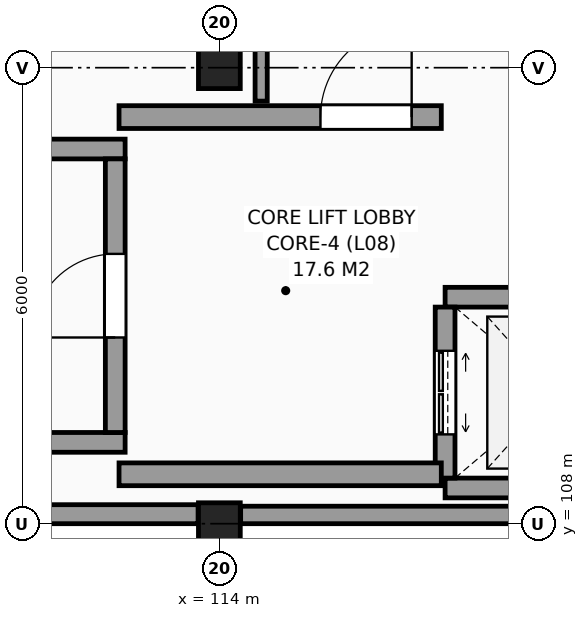
"""IFC4 building model, lengths in metres.
Left out: names, types, materials, properties, quantities, classifications, styles, units other than length and angle.
Written with IfcOpenShell. Run it as: python <this file> out.ifc"""

import sys

from ifc_helpers import new_model, si_unit, direction, frame, frame_2d, origin, origin_2d, place, context, subcontext, project, spatial, rectangle, extrude, element, fill, save


model = new_model("IFC4")
c1 = context("Model", 3, precision=1e-05, world=origin(), true_north=direction((0.0, 1.0)))
c2 = subcontext(c1, "Body", "Model", "MODEL_VIEW")
j1 = project(units=[si_unit("LENGTHUNIT", "METRE"), si_unit("PLANEANGLEUNIT", "RADIAN")], contexts=[c1])
p1 = place(None, origin())
s1 = spatial("IfcSite", under=j1, at=p1, CompositionType="ELEMENT")
p2 = place(p1, origin())
s2 = spatial("IfcBuilding", under=s1, at=p2, CompositionType="ELEMENT")
p3 = place(p2, frame((0.0, 0.0, 34.8)))
s3 = spatial("IfcBuildingStorey", under=s2, at=p3, CompositionType="ELEMENT", Elevation=34.8)
for number, where, z_axis, x_axis in (
    (1, (114.0, 108.0, 0.0), (0.0, 0.0, 1.0), (1.0, 0.0, 0.0)),
    (2, (114.0, 114.0, 0.0), (0.0, 0.0, 1.0), (1.0, 0.0, 0.0)),
):
    element("IfcColumn", number, at=place(p3, frame(where, z_axis=z_axis, x_axis=x_axis)), inside=s3, PredefinedType="COLUMN", context=c2, shape_type="SweptSolid", body=[
        extrude(rectangle(XDim=0.55, YDim=0.55, at=origin_2d()), origin(), (0.0, 0.0, 1.0), 3.3),
    ])
p4 = place(p3, frame((108.305, 108.125, 0.0), z_axis=(0.0, 0.0, 1.0), x_axis=(1.0, 0.0, 0.0)))
e3 = element("IfcWall", 3, at=p4, inside=s3, PredefinedType="SOLIDWALL", context=c2, shape_type="SweptSolid", body=[
    extrude(rectangle(XDim=5.415, YDim=0.25, at=frame_2d((2.708, 0.0))), origin(), (0.0, 0.0, 1.0), 2.42),
])
p5 = place(p3, frame((114.28, 108.115, 0.0), z_axis=(0.0, 0.0, 1.0), x_axis=(1.0, 0.0, 0.0)))
e4 = element("IfcWall", 4, at=p5, inside=s3, PredefinedType="SOLIDWALL", context=c2, shape_type="SweptSolid", body=[
    extrude(rectangle(XDim=5.415, YDim=0.23, at=frame_2d((2.708, 0.0))), origin(), (0.0, 0.0, 1.0), 2.42),
])
for number, where, z_axis, x_axis in (
    (5, (102.04, 109.07, 0.0), (0.0, 0.0, 1.0), (1.0, 0.0, 0.0)),
    (6, (102.04, 112.93, 0.0), (0.0, 0.0, 1.0), (1.0, 0.0, 0.0)),
):
    element("IfcWall", number, at=place(p3, frame(where, z_axis=z_axis, x_axis=x_axis)), inside=s3, PredefinedType="SHEAR", context=c2, shape_type="SweptSolid", body=[
        extrude(rectangle(XDim=10.72, YDim=0.26, at=frame_2d((5.36, 0.0))), origin(), (0.0, 0.0, 1.0), 3.3),
    ])
p6 = place(p3, frame((112.63, 109.2, 0.0), z_axis=(0.0, 0.0, 1.0), x_axis=(0.0, 1.0, 0.0)))
e7 = element("IfcWall", 7, at=p6, inside=s3, PredefinedType="SHEAR", context=c2, shape_type="SweptSolid", body=[
    extrude(rectangle(XDim=3.6, YDim=0.26, at=frame_2d((1.8, 0.0))), origin(), (0.0, 0.0, 1.0), 3.3),
])
p7 = place(p6, frame((1.25, 0.0, 0.0)))
e8 = element("IfcOpeningElement", 8, at=p7, cuts=e7, PredefinedType="OPENING", context=c2, shape_type="SweptSolid", body=[
    extrude(rectangle(XDim=1.1, YDim=2.15, at=frame_2d((0.55, 1.075))), frame((0.0, 0.14, 0.0), z_axis=(0.0, -1.0, 0.0), x_axis=(1.0, 0.0, 0.0)), (0.0, 0.0, 1.0), 0.28),
])
for number, where, z_axis, x_axis in (
    (9, (116.97, 108.47, 0.0), (0.0, 0.0, 1.0), (1.0, 0.0, 0.0)),
    (10, (116.97, 110.98, 0.0), (0.0, 0.0, 1.0), (1.0, 0.0, 0.0)),
):
    element("IfcWall", number, at=place(p3, frame(where, z_axis=z_axis, x_axis=x_axis)), inside=s3, PredefinedType="SHEAR", context=c2, shape_type="SweptSolid", body=[
        extrude(rectangle(XDim=2.91, YDim=0.26, at=frame_2d((1.455, 0.0))), origin(), (0.0, 0.0, 1.0), 3.3),
    ])
p8 = place(p3, frame((116.97, 108.6, 0.0), z_axis=(0.0, 0.0, 1.0), x_axis=(0.0, 1.0, 0.0)))
e11 = element("IfcWall", 11, at=p8, inside=s3, PredefinedType="SHEAR", context=c2, shape_type="SweptSolid", body=[
    extrude(rectangle(XDim=2.25, YDim=0.26, at=frame_2d((1.125, 0.0))), origin(), (0.0, 0.0, 1.0), 3.3),
])
p9 = place(p8, frame((0.575, 0.0, 0.0)))
e12 = element("IfcOpeningElement", 12, at=p9, cuts=e11, PredefinedType="OPENING", context=c2, shape_type="SweptSolid", body=[
    extrude(rectangle(XDim=1.1, YDim=2.2, at=frame_2d((0.55, 1.1))), frame((0.0, 0.14, 0.0), z_axis=(0.0, -1.0, 0.0), x_axis=(1.0, 0.0, 0.0)), (0.0, 0.0, 1.0), 0.28),
])
p10 = place(p3, frame((112.68, 113.35, 0.0), z_axis=(0.0, 0.0, 1.0), x_axis=(1.0, 0.0, 0.0)))
e13 = element("IfcWall", 13, at=p10, inside=s3, PredefinedType="SHEAR", context=c2, shape_type="SweptSolid", body=[
    extrude(rectangle(XDim=4.24, YDim=0.3, at=frame_2d((2.12, 0.0))), origin(), (0.0, 0.0, 1.0), 3.3),
])
p11 = place(p10, frame((2.65, 0.0, 0.0)))
e14 = element("IfcOpeningElement", 14, at=p11, cuts=e13, PredefinedType="OPENING", context=c2, shape_type="SweptSolid", body=[
    extrude(rectangle(XDim=1.2, YDim=2.2, at=frame_2d((0.6, 1.1))), frame((0.0, 0.16, 0.0), z_axis=(0.0, -1.0, 0.0), x_axis=(1.0, 0.0, 0.0)), (0.0, 0.0, 1.0), 0.32),
])
p12 = place(p3, frame((112.68, 108.65, 0.0), z_axis=(0.0, 0.0, 1.0), x_axis=(1.0, 0.0, 0.0)))
e15 = element("IfcWall", 15, at=p12, inside=s3, PredefinedType="SHEAR", context=c2, shape_type="SweptSolid", body=[
    extrude(rectangle(XDim=4.24, YDim=0.3, at=frame_2d((2.12, 0.0))), origin(), (0.0, 0.0, 1.0), 3.3),
])
p13 = place(p3, frame((114.55, 113.56, 0.0), z_axis=(0.0, 0.0, 1.0), x_axis=(0.0, 1.0, 0.0)))
e16 = element("IfcWall", 16, at=p13, inside=s3, PredefinedType="PARTITIONING", context=c2, shape_type="SweptSolid", body=[
    extrude(rectangle(XDim=2.24, YDim=0.16, at=frame_2d((1.12, 0.0))), origin(), (0.0, 0.0, 1.0), 3.07),
])
p14 = place(p7, origin())
e17 = element("IfcDoor", 17, at=p14, inside=s3, OperationType="SINGLE_SWING_LEFT", PredefinedType="DOOR", context=c2, shape_type="SweptSolid", body=[
    extrude(rectangle(XDim=1.1, YDim=2.15, at=frame_2d((0.55, 1.075))), frame((0.0, 0.025, 0.0), z_axis=(0.0, -1.0, 0.0), x_axis=(1.0, 0.0, 0.0)), (0.0, 0.0, 1.0), 0.05),
])
fill(e8, e17)
p15 = place(p9, origin())
e18 = element("IfcDoor", 18, at=p15, inside=s3, OperationType="DOUBLE_DOOR_SLIDING", PredefinedType="DOOR", context=c2, shape_type="SweptSolid", body=[
    extrude(rectangle(XDim=1.1, YDim=2.2, at=frame_2d((0.55, 1.1))), frame((0.0, 0.025, 0.0), z_axis=(0.0, -1.0, 0.0), x_axis=(1.0, 0.0, 0.0)), (0.0, 0.0, 1.0), 0.05),
])
fill(e12, e18)
p16 = place(p11, origin())
e19 = element("IfcDoor", 19, at=p16, inside=s3, OperationType="SINGLE_SWING_RIGHT", PredefinedType="DOOR", context=c2, shape_type="SweptSolid", body=[
    extrude(rectangle(XDim=1.2, YDim=2.2, at=frame_2d((0.6, 1.1))), frame((0.0, 0.025, 0.0), z_axis=(0.0, -1.0, 0.0), x_axis=(1.0, 0.0, 0.0)), (0.0, 0.0, 1.0), 0.05),
])
fill(e14, e19)
save(model, sys.argv[1])
